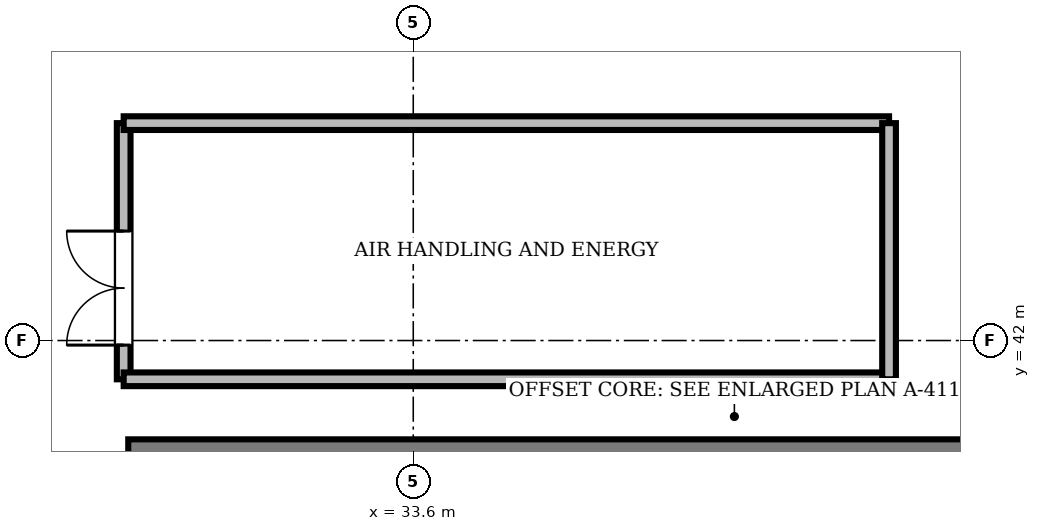
"""IFC4 building model, lengths in metres.
Left out: names, types, materials, properties, quantities, classifications, styles, units other than length and angle.
Written with IfcOpenShell. Run it as: python <this file> out.ifc"""

import sys

from ifc_helpers import new_model, si_unit, direction, frame, frame_2d, origin, place, context, subcontext, project, spatial, rectangle, extrude, source, transform, mapped, element, fill, save


model = new_model("IFC4")
c1 = context("Model", 3, precision=1e-05, world=origin(), true_north=direction((0.0, 1.0)))
c2 = subcontext(c1, "Body", "Model", "MODEL_VIEW")
j1 = project(units=[si_unit("LENGTHUNIT", "METRE"), si_unit("PLANEANGLEUNIT", "RADIAN")], contexts=[c1])
p1 = place(None, origin())
s1 = spatial("IfcSite", under=j1, at=p1, CompositionType="ELEMENT")
p2 = place(p1, origin())
s2 = spatial("IfcBuilding", under=s1, at=p2, CompositionType="ELEMENT")
p3 = place(p2, frame((0.0, 0.0, 237.3)))
s3 = spatial("IfcBuildingStorey", under=s2, at=p3, CompositionType="ELEMENT", Elevation=237.3)
m1 = source(origin(), c2, "Body", "SweptSolid", [
    extrude(rectangle(XDim=17.52, YDim=0.8, at=frame_2d((8.76, 0.0))), origin(), (0.0, 0.0, 1.0), 4.75),
])
p4 = place(p3, frame((29.85, 40.3, 0.0), z_axis=(0.0, 0.0, 1.0), x_axis=(1.0, 0.0, 0.0)))
e1 = element("IfcWall", 1, at=p4, inside=s3, PredefinedType="SHEAR", context=c2, shape_type="MappedRepresentation", body=[
    mapped(m1, transform((0.0, 0.0, 0.0), scale=1.0)),
])
m2 = source(origin(), c2, "Body", "SweptSolid", [
    extrude(rectangle(XDim=3.37, YDim=0.18, at=frame_2d((1.685, 0.0))), origin(), (0.0, 0.0, 1.0), 4.75),
])
p5 = place(p3, frame((29.79, 41.49, 0.0), z_axis=(0.0, 0.0, 1.0), x_axis=(0.0, 1.0, 0.0)))
e2 = element("IfcWall", 2, at=p5, inside=s3, PredefinedType="PARTITIONING", context=c2, shape_type="MappedRepresentation", body=[
    mapped(m2, transform((0.0, 0.0, 0.0), scale=1.0)),
])
m3 = source(origin(), c2, "Body", "SweptSolid", [
    extrude(rectangle(XDim=1.5, YDim=2.3, at=frame_2d((0.75, 1.15))), frame((0.0, 0.1, 0.0), z_axis=(0.0, -1.0, 0.0), x_axis=(1.0, 0.0, 0.0)), (0.0, 0.0, 1.0), 0.2),
])
p6 = place(p5, frame((0.45, 0.0, 0.0)))
e3 = element("IfcOpeningElement", 3, at=p6, cuts=e2, PredefinedType="OPENING", context=c2, shape_type="MappedRepresentation", body=[
    mapped(m3, transform((0.0, 0.0, 0.0), scale=1.0)),
])
m4 = source(origin(), c2, "Body", "SweptSolid", [
    extrude(rectangle(XDim=10.07, YDim=0.18, at=frame_2d((5.035, 0.0))), origin(), (0.0, 0.0, 1.0), 4.75),
])
for number, where, z_axis, x_axis in (
    (4, (29.79, 41.49, 0.0), (0.0, 0.0, 1.0), (1.0, 0.0, 0.0)),
    (5, (29.79, 44.86, 0.0), (0.0, 0.0, 1.0), (1.0, 0.0, 0.0)),
):
    element("IfcWall", number, at=place(p3, frame(where, z_axis=z_axis, x_axis=x_axis)), inside=s3, PredefinedType="PARTITIONING", context=c2, shape_type="MappedRepresentation", body=[
        mapped(m4, transform((0.0, 0.0, 0.0), scale=1.0)),
    ])
p7 = place(p3, frame((39.86, 41.49, 0.0), z_axis=(0.0, 0.0, 1.0), x_axis=(0.0, 1.0, 0.0)))
e6 = element("IfcWall", 6, at=p7, inside=s3, PredefinedType="PARTITIONING", context=c2, shape_type="MappedRepresentation", body=[
    mapped(m2, transform((0.0, 0.0, 0.0), scale=1.0)),
])
m5 = source(origin(), c2, "Body", "SweptSolid", [
    extrude(rectangle(XDim=1.5, YDim=2.3, at=frame_2d((0.75, 1.15))), frame((0.0, 0.025, 0.0), z_axis=(0.0, -1.0, 0.0), x_axis=(1.0, 0.0, 0.0)), (0.0, 0.0, 1.0), 0.05),
])
p8 = place(p6, origin())
e7 = element("IfcDoor", 7, at=p8, inside=s3, OperationType="DOUBLE_DOOR_SINGLE_SWING", PredefinedType="DOOR", context=c2, shape_type="MappedRepresentation", body=[
    mapped(m5, transform((0.0, 0.0, 0.0), scale=1.0)),
])
fill(e3, e7)
save(model, sys.argv[1])
